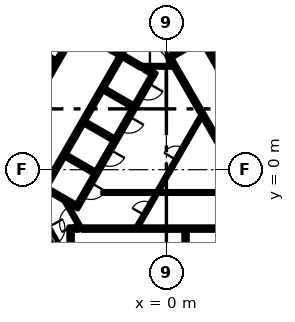
"""IFC4 building model, lengths in metres.
Left out: names, types, materials, properties, quantities, classifications, styles, units other than length and angle.
Written with IfcOpenShell. Run it as: python <this file> out.ifc"""

import sys

from ifc_helpers import new_model, si_unit, direction, frame, frame_2d, origin, place, context, subcontext, project, spatial, polyline, rectangle, outline, extrude, element, fill, save


model = new_model("IFC4")
c1 = context("Model", 3, precision=1e-05, world=origin(), true_north=direction((0.0, 1.0)))
c2 = subcontext(c1, "Body", "Model", "MODEL_VIEW")
j1 = project(units=[si_unit("LENGTHUNIT", "METRE"), si_unit("PLANEANGLEUNIT", "RADIAN")], contexts=[c1])
p1 = place(None, origin())
s1 = spatial("IfcSite", under=j1, at=p1, CompositionType="ELEMENT")
p2 = place(p1, origin())
s2 = spatial("IfcBuilding", under=s1, at=p2, CompositionType="ELEMENT")
p3 = place(p2, frame((0.0, 0.0, 16.2)))
s3 = spatial("IfcBuildingStorey", under=s2, at=p3, CompositionType="ELEMENT", Elevation=16.2)
p4 = place(p3, frame((-15.36, -1.503, 0.0), z_axis=(0.0, 0.0, 1.0), x_axis=(0.50000389221, 0.866023156604, 0.0)))
e1 = element("IfcWall", 1, at=p4, inside=s3, PredefinedType="SOLIDWALL", context=c2, shape_type="SweptSolid", body=[
    extrude(rectangle(XDim=21.0, YDim=0.9, at=frame_2d((10.5, 0.0))), origin(), (0.0, 0.0, 1.0), 5.4),
])
p5 = place(p3, frame((-5.545, -3.875, 0.0), z_axis=(0.0, 0.0, 1.0), x_axis=(1.0, 0.0, 0.0)))
e2 = element("IfcWall", 2, at=p5, inside=s3, PredefinedType="SOLIDWALL", context=c2, shape_type="SweptSolid", body=[
    extrude(rectangle(XDim=11.97, YDim=0.25, at=frame_2d((5.985, 0.0))), origin(), (0.0, 0.0, 1.0), 5.4),
])
p6 = place(p3, frame((-6.425, -3.875, 0.0), z_axis=(0.0, 0.0, 1.0), x_axis=(1.0, 0.0, 0.0)))
e3 = element("IfcWall", 3, at=p6, inside=s3, PredefinedType="SOLIDWALL", context=c2, shape_type="SweptSolid", body=[
    extrude(rectangle(XDim=0.658, YDim=0.25, at=frame_2d((0.329, 0.0))), origin(), (0.0, 0.0, 1.0), 5.4),
])
p7 = place(p3, frame((1.26, -4.0, 0.0), z_axis=(0.0, 0.0, 1.0), x_axis=(0.0, -1.0, 0.0)))
e4 = element("IfcWall", 4, at=p7, inside=s3, PredefinedType="SOLIDWALL", context=c2, shape_type="SweptSolid", body=[
    extrude(rectangle(XDim=2.2, YDim=0.25, at=frame_2d((1.1, 0.0))), origin(), (0.0, 0.0, 1.0), 5.4),
])
p8 = place(p3, frame((-6.3, -4.0, 0.0), z_axis=(0.0, 0.0, 1.0), x_axis=(0.0, -1.0, 0.0)))
e5 = element("IfcWall", 5, at=p8, inside=s3, PredefinedType="SOLIDWALL", context=c2, shape_type="SweptSolid", body=[
    extrude(rectangle(XDim=3.154, YDim=0.25, at=frame_2d((1.577, 0.0))), origin(), (0.0, 0.0, 1.0), 5.4),
])
p9 = place(p3, origin())
e6 = element("IfcWall", 6, at=p9, inside=s3, PredefinedType="SOLIDWALL", context=c2, shape_type="SweptSolid", body=[
    extrude(outline(polyline([(6.552, -3.348), (6.677, -3.564), (6.46, -3.689), (0.448, 6.725), (0.565, 6.725), (0.566, 6.725), (0.566, 6.725), (0.566, 6.875), (0.566, 6.875), (0.565, 6.875), (0.361, 6.875), (0.035, 7.439), (0.252, 7.564), (0.377, 7.348), (6.552, -3.348)])), origin(), (0.0, 0.0, 1.0), 5.4),
])
p10 = place(p3, frame((0.314, 7.456, 0.0), z_axis=(0.0, 0.0, 1.0), x_axis=(0.866013897511, 0.50001992892, 0.0)))
e7 = element("IfcWall", 7, at=p10, inside=s3, PredefinedType="SOLIDWALL", context=c2, shape_type="SweptSolid", body=[
    extrude(rectangle(XDim=3.268, YDim=0.25, at=frame_2d((1.634, 0.0))), origin(), (0.0, 0.0, 1.0), 5.4),
])
p11 = place(p3, frame((-8.06, -1.311, 0.0), z_axis=(0.0, 0.0, 1.0), x_axis=(0.50000273126, 0.866023826885, 0.0)))
e8 = element("IfcWall", 8, at=p11, inside=s3, PredefinedType="SOLIDWALL", context=c2, shape_type="SweptSolid", body=[
    extrude(rectangle(XDim=10.33, YDim=0.25, at=frame_2d((5.165, 0.0))), origin(), (0.0, 0.0, 1.0), 5.4),
])
p12 = place(p3, frame((-1.758, 6.835, 0.0), z_axis=(0.0, 0.0, 1.0), x_axis=(0.865982457891, -0.500074377092, 0.0)))
e9 = element("IfcWall", 9, at=p12, inside=s3, PredefinedType="SOLIDWALL", context=c2, shape_type="SweptSolid", body=[
    extrude(rectangle(XDim=0.2, YDim=0.25, at=frame_2d((0.1, 0.0))), origin(), (0.0, 0.0, 1.0), 5.4),
])
p13 = place(p3, frame((-1.76, 6.836, 0.0), z_axis=(0.0, 0.0, 1.0), x_axis=(-0.865952863304, 0.500125622755, 0.0)))
e10 = element("IfcWall", 10, at=p13, inside=s3, PredefinedType="SOLIDWALL", context=c2, shape_type="SweptSolid", body=[
    extrude(rectangle(XDim=1.258, YDim=0.25, at=frame_2d((0.629, 0.0))), origin(), (0.0, 0.0, 1.0), 5.4),
])
p14 = place(p3, frame((-0.728, 6.24, 0.0), z_axis=(0.0, 0.0, 1.0), x_axis=(-0.865955664968, 0.500120771724, 0.0)))
e11 = element("IfcWall", 11, at=p14, inside=s3, PredefinedType="SOLIDWALL", context=c2, shape_type="SweptSolid", body=[
    extrude(rectangle(XDim=0.778, YDim=0.25, at=frame_2d((0.389, 0.0))), origin(), (0.0, 0.0, 1.0), 5.4),
])
for number, where, z_axis, x_axis in (
    (12, (-2.204, 4.182, 0.0), (0.0, 0.0, 1.0), (-0.866, 0.5, 0.0)),
    (13, (-5.369, 3.1, 0.0), (0.0, 0.0, 1.0), (0.866, -0.5, 0.0)),
    (14, (-4.724, -0.182, 0.0), (0.0, 0.0, 1.0), (-0.866, 0.5, 0.0)),
):
    element("IfcWall", number, at=place(p3, frame(where, z_axis=z_axis, x_axis=x_axis)), inside=s3, PredefinedType="SOLIDWALL", context=c2, shape_type="SweptSolid", body=[
        extrude(rectangle(XDim=2.2, YDim=0.25, at=frame_2d((1.1, 0.0))), origin(), (0.0, 0.0, 1.0), 5.4),
    ])
e15 = element("IfcWall", 15, at=p9, inside=s3, PredefinedType="SOLIDWALL", context=c2, shape_type="SweptSolid", body=[
    extrude(outline(polyline([(-5.922, -2.257), (-5.922, -2.257), (-5.705, -2.382), (-5.83, -2.598), (-6.483, -2.221), (-6.591, -2.033), (-6.591, -2.033), (-6.7, -2.096), (-7.952, -1.373), (-7.827, -1.156), (-5.922, -2.257)])), origin(), (0.0, 0.0, 1.0), 5.4),
])
e16 = element("IfcWall", 16, at=p9, inside=s3, PredefinedType="SOLIDWALL", context=c2, shape_type="SweptSolid", body=[
    extrude(outline(polyline([(-3.128, 7.481), (-3.259, 7.557), (-3.134, 7.773), (-3.003, 7.698), (-3.128, 7.481)])), origin(), (0.0, 0.0, 1.0), 5.4),
])
p15 = place(p3, frame((-7.314, 7.132, 0.0), z_axis=(0.0, 0.0, 1.0), x_axis=(-0.866008176907, 0.50002983664, 0.0)))
e17 = element("IfcWall", 17, at=p15, inside=s3, PredefinedType="SOLIDWALL", context=c2, shape_type="SweptSolid", body=[
    extrude(rectangle(XDim=2.2, YDim=0.25, at=frame_2d((1.1, 0.0))), origin(), (0.0, 0.0, 1.0), 5.4),
])
p16 = place(p3, frame((-1.887, -3.718, 0.0), z_axis=(0.0, 0.0, 1.0), x_axis=(0.500165633897, 0.865929753888, 0.0)))
e18 = element("IfcWall", 18, at=p16, inside=s3, PredefinedType="PARTITIONING", context=c2, shape_type="SweptSolid", body=[
    extrude(rectangle(XDim=0.254, YDim=0.15, at=frame_2d((0.127, 0.0))), origin(), (0.0, 0.0, 1.0), 4.1),
])
p17 = place(p3, frame((-4.2, -1.5, 0.0), z_axis=(0.0, 0.0, 1.0), x_axis=(1.0, 0.0, 0.0)))
e19 = element("IfcWall", 19, at=p17, inside=s3, PredefinedType="PARTITIONING", context=c2, shape_type="SweptSolid", body=[
    extrude(rectangle(XDim=9.359, YDim=0.15, at=frame_2d((4.68, 0.0))), origin(), (0.0, 0.0, 1.0), 4.1),
])
p18 = place(p3, frame((-0.544, -1.393, 0.0), z_axis=(0.0, 0.0, 1.0), x_axis=(0.499928740635, 0.866066541489, 0.0)))
e20 = element("IfcWall", 20, at=p18, inside=s3, PredefinedType="PARTITIONING", context=c2, shape_type="SweptSolid", body=[
    extrude(rectangle(XDim=1.912, YDim=0.15, at=frame_2d((0.956, 0.0))), origin(), (0.0, 0.0, 1.0), 4.1),
])
p19 = place(p3, frame((1.312, 1.822, 0.0), z_axis=(0.0, 0.0, 1.0), x_axis=(0.500003549559, 0.866023354436, 0.0)))
e21 = element("IfcWall", 21, at=p19, inside=s3, PredefinedType="PARTITIONING", context=c2, shape_type="SweptSolid", body=[
    extrude(rectangle(XDim=1.93, YDim=0.15, at=frame_2d((0.965, 0.0))), origin(), (0.0, 0.0, 1.0), 4.1),
])
p20 = place(p3, frame((8.565, -2.185, 0.0), z_axis=(0.0, 0.0, 1.0), x_axis=(-0.499997954832, 0.866026584559, 0.0)))
e22 = element("IfcWall", 22, at=p20, inside=s3, PredefinedType="SOLIDWALL", context=c2, shape_type="SweptSolid", body=[
    extrude(rectangle(XDim=12.35, YDim=0.25, at=frame_2d((6.175, 0.0))), origin(), (0.0, 0.0, 1.0), 5.4),
])
p21 = place(p20, frame((5.725, 0.0, 0.0)))
e23 = element("IfcOpeningElement", 23, at=p21, cuts=e22, PredefinedType="OPENING", context=c2, shape_type="SweptSolid", body=[
    extrude(rectangle(XDim=0.9, YDim=2.1, at=frame_2d((0.45, 1.05))), frame((0.0, 0.135, 0.0), z_axis=(0.0, -1.0, 0.0), x_axis=(1.0, 0.0, 0.0)), (0.0, 0.0, 1.0), 0.27),
])
p22 = place(p3, frame((-6.008, 9.144, 0.0), z_axis=(0.0, 0.0, 1.0), x_axis=(-0.500006956611, -0.866021387346, 0.0)))
e24 = element("IfcWall", 24, at=p22, inside=s3, PredefinedType="SOLIDWALL", context=c2, shape_type="SweptSolid", body=[
    extrude(rectangle(XDim=9.83, YDim=0.25, at=frame_2d((4.915, 0.0))), origin(), (0.0, 0.0, 1.0), 5.4),
])
p23 = place(p22, frame((6.985, 0.0, 0.0)))
e25 = element("IfcOpeningElement", 25, at=p23, cuts=e24, PredefinedType="OPENING", context=c2, shape_type="SweptSolid", body=[
    extrude(rectangle(XDim=0.9, YDim=2.1, at=frame_2d((0.45, 1.05))), frame((0.0, 0.135, 0.0), z_axis=(0.0, -1.0, 0.0), x_axis=(1.0, 0.0, 0.0)), (0.0, 0.0, 1.0), 0.27),
])
p24 = place(p3, frame((-0.898, 6.194, 0.0), z_axis=(0.0, 0.0, 1.0), x_axis=(-0.499996202215, -0.866027596426, 0.0)))
e26 = element("IfcWall", 26, at=p24, inside=s3, PredefinedType="SOLIDWALL", context=c2, shape_type="SweptSolid", body=[
    extrude(rectangle(XDim=9.83, YDim=0.25, at=frame_2d((4.915, 0.0))), origin(), (0.0, 0.0, 1.0), 5.4),
])
p25 = place(p24, frame((0.585, 0.0, 0.0)))
e27 = element("IfcOpeningElement", 27, at=p25, cuts=e26, PredefinedType="OPENING", context=c2, shape_type="SweptSolid", body=[
    extrude(rectangle(XDim=1.1, YDim=2.1, at=frame_2d((0.55, 1.05))), frame((0.0, 0.135, 0.0), z_axis=(0.0, -1.0, 0.0), x_axis=(1.0, 0.0, 0.0)), (0.0, 0.0, 1.0), 0.27),
])
p26 = place(p24, frame((3.105, 0.0, 0.0)))
e28 = element("IfcOpeningElement", 28, at=p26, cuts=e26, PredefinedType="OPENING", context=c2, shape_type="SweptSolid", body=[
    extrude(rectangle(XDim=1.1, YDim=2.1, at=frame_2d((0.55, 1.05))), frame((0.0, 0.135, 0.0), z_axis=(0.0, -1.0, 0.0), x_axis=(1.0, 0.0, 0.0)), (0.0, 0.0, 1.0), 0.27),
])
p27 = place(p24, frame((5.625, 0.0, 0.0)))
e29 = element("IfcOpeningElement", 29, at=p27, cuts=e26, PredefinedType="OPENING", context=c2, shape_type="SweptSolid", body=[
    extrude(rectangle(XDim=1.1, YDim=2.1, at=frame_2d((0.55, 1.05))), frame((0.0, 0.135, 0.0), z_axis=(0.0, -1.0, 0.0), x_axis=(1.0, 0.0, 0.0)), (0.0, 0.0, 1.0), 0.27),
])
p28 = place(p24, frame((8.145, 0.0, 0.0)))
e30 = element("IfcOpeningElement", 30, at=p28, cuts=e26, PredefinedType="OPENING", context=c2, shape_type="SweptSolid", body=[
    extrude(rectangle(XDim=1.1, YDim=2.1, at=frame_2d((0.55, 1.05))), frame((0.0, 0.135, 0.0), z_axis=(0.0, -1.0, 0.0), x_axis=(1.0, 0.0, 0.0)), (0.0, 0.0, 1.0), 0.27),
])
p29 = place(p3, frame((-8.103, -3.466, 0.0), z_axis=(0.0, 0.0, 1.0), x_axis=(0.500078061341, -0.865980330357, 0.0)))
e31 = element("IfcWall", 31, at=p29, inside=s3, PredefinedType="SOLIDWALL", context=c2, shape_type="SweptSolid", body=[
    extrude(rectangle(XDim=2.1, YDim=0.4, at=frame_2d((1.05, 0.0))), origin(), (0.0, 0.0, 1.0), 5.4),
])
p30 = place(p29, frame((0.45, 0.0, 0.0)))
e32 = element("IfcOpeningElement", 32, at=p30, cuts=e31, PredefinedType="OPENING", context=c2, shape_type="SweptSolid", body=[
    extrude(rectangle(XDim=1.2, YDim=2.1, at=frame_2d((0.6, 1.05))), frame((0.0, 0.21, 0.0), z_axis=(0.0, -1.0, 0.0), x_axis=(1.0, 0.0, 0.0)), (0.0, 0.0, 1.0), 0.42),
])
p31 = place(p3, frame((-1.76, -3.498, 0.0), z_axis=(0.0, 0.0, 1.0), x_axis=(0.499977374825, 0.866038466041, 0.0)))
e33 = element("IfcWall", 33, at=p31, inside=s3, PredefinedType="PARTITIONING", context=c2, shape_type="SweptSolid", body=[
    extrude(rectangle(XDim=2.1, YDim=0.15, at=frame_2d((1.05, 0.0))), origin(), (0.0, 0.0, 1.0), 4.1),
])
p32 = place(p31, frame((0.6, 0.0, 0.0)))
e34 = element("IfcOpeningElement", 34, at=p32, cuts=e33, PredefinedType="OPENING", context=c2, shape_type="SweptSolid", body=[
    extrude(rectangle(XDim=0.9, YDim=2.1, at=frame_2d((0.45, 1.05))), frame((0.0, 0.085, 0.0), z_axis=(0.0, -1.0, 0.0), x_axis=(1.0, 0.0, 0.0)), (0.0, 0.0, 1.0), 0.17),
])
p33 = place(p3, frame((-1.534, 6.8, 0.0), z_axis=(0.0, 0.0, 1.0), x_axis=(1.0, 0.0, 0.0)))
e35 = element("IfcWall", 35, at=p33, inside=s3, PredefinedType="PARTITIONING", context=c2, shape_type="SweptSolid", body=[
    extrude(rectangle(XDim=2.1, YDim=0.15, at=frame_2d((1.05, 0.0))), origin(), (0.0, 0.0, 1.0), 4.1),
])
p34 = place(p33, frame((0.45, 0.0, 0.0)))
e36 = element("IfcOpeningElement", 36, at=p34, cuts=e35, PredefinedType="OPENING", context=c2, shape_type="SweptSolid", body=[
    extrude(rectangle(XDim=1.2, YDim=2.1, at=frame_2d((0.6, 1.05))), frame((0.0, 0.085, 0.0), z_axis=(0.0, -1.0, 0.0), x_axis=(1.0, 0.0, 0.0)), (0.0, 0.0, 1.0), 0.17),
])
p35 = place(p3, frame((-5.606, -3.89, 0.0), z_axis=(0.0, 0.0, 1.0), x_axis=(-0.500027713859, 0.866009402589, 0.0)))
e37 = element("IfcWall", 37, at=p35, inside=s3, PredefinedType="PARTITIONING", context=c2, shape_type="SweptSolid", body=[
    extrude(rectangle(XDim=2.1, YDim=0.15, at=frame_2d((1.05, 0.0))), origin(), (0.0, 0.0, 1.0), 4.1),
])
p36 = place(p35, frame((0.45, 0.0, 0.0)))
e38 = element("IfcOpeningElement", 38, at=p36, cuts=e37, PredefinedType="OPENING", context=c2, shape_type="SweptSolid", body=[
    extrude(rectangle(XDim=1.2, YDim=2.1, at=frame_2d((0.6, 1.05))), frame((0.0, 0.085, 0.0), z_axis=(0.0, -1.0, 0.0), x_axis=(1.0, 0.0, 0.0)), (0.0, 0.0, 1.0), 0.17),
])
p37 = place(p3, frame((-4.409, 8.365, 0.0), z_axis=(0.0, 0.0, 1.0), x_axis=(0.866034573852, -0.49998411664, 0.0)))
e39 = element("IfcWall", 39, at=p37, inside=s3, PredefinedType="SOLIDWALL", context=c2, shape_type="SweptSolid", body=[
    extrude(rectangle(XDim=1.4, YDim=0.25, at=frame_2d((0.7, 0.0))), origin(), (0.0, 0.0, 1.0), 5.4),
])
p38 = place(p37, frame((0.1, 0.0, 0.0)))
e40 = element("IfcOpeningElement", 40, at=p38, cuts=e39, PredefinedType="OPENING", context=c2, shape_type="SweptSolid", body=[
    extrude(rectangle(XDim=1.2, YDim=2.1, at=frame_2d((0.6, 1.05))), frame((0.0, 0.135, 0.0), z_axis=(0.0, -1.0, 0.0), x_axis=(1.0, 0.0, 0.0)), (0.0, 0.0, 1.0), 0.27),
])
p39 = place(p3, frame((0.412, 0.263, 0.0), z_axis=(0.0, 0.0, 1.0), x_axis=(0.500062916607, 0.865989075817, 0.0)))
e41 = element("IfcWall", 41, at=p39, inside=s3, PredefinedType="PARTITIONING", context=c2, shape_type="SweptSolid", body=[
    extrude(rectangle(XDim=1.8, YDim=0.15, at=frame_2d((0.9, 0.0))), origin(), (0.0, 0.0, 1.0), 4.1),
])
p40 = place(p39, frame((0.45, 0.0, 0.0)))
e42 = element("IfcOpeningElement", 42, at=p40, cuts=e41, PredefinedType="OPENING", context=c2, shape_type="SweptSolid", body=[
    extrude(rectangle(XDim=0.9, YDim=2.1, at=frame_2d((0.45, 1.05))), frame((0.0, 0.085, 0.0), z_axis=(0.0, -1.0, 0.0), x_axis=(1.0, 0.0, 0.0)), (0.0, 0.0, 1.0), 0.17),
])
p41 = place(p3, frame((-6.875, 40.198, 0.0), z_axis=(0.0, 0.0, 1.0), x_axis=(-0.500000527961, -0.866025098966, 0.0)))
e43 = element("IfcWall", 43, at=p41, inside=s3, PredefinedType="SOLIDWALL", context=c2, shape_type="SweptSolid", body=[
    extrude(rectangle(XDim=62.75, YDim=0.25, at=frame_2d((31.375, 0.0))), origin(), (0.0, 0.0, 1.0), 5.0),
])
p42 = place(p25, origin())
e44 = element("IfcDoor", 44, at=p42, inside=s3, OperationType="DOUBLE_DOOR_SLIDING", PredefinedType="DOOR", context=c2, shape_type="SweptSolid", body=[
    extrude(rectangle(XDim=1.1, YDim=2.1, at=frame_2d((0.55, 1.05))), frame((0.0, 0.025, 0.0), z_axis=(0.0, -1.0, 0.0), x_axis=(1.0, 0.0, 0.0)), (0.0, 0.0, 1.0), 0.05),
])
fill(e27, e44)
p43 = place(p26, origin())
e45 = element("IfcDoor", 45, at=p43, inside=s3, OperationType="DOUBLE_DOOR_SLIDING", PredefinedType="DOOR", context=c2, shape_type="SweptSolid", body=[
    extrude(rectangle(XDim=1.1, YDim=2.1, at=frame_2d((0.55, 1.05))), frame((0.0, 0.025, 0.0), z_axis=(0.0, -1.0, 0.0), x_axis=(1.0, 0.0, 0.0)), (0.0, 0.0, 1.0), 0.05),
])
fill(e28, e45)
p44 = place(p27, origin())
e46 = element("IfcDoor", 46, at=p44, inside=s3, OperationType="DOUBLE_DOOR_SLIDING", PredefinedType="DOOR", context=c2, shape_type="SweptSolid", body=[
    extrude(rectangle(XDim=1.1, YDim=2.1, at=frame_2d((0.55, 1.05))), frame((0.0, 0.025, 0.0), z_axis=(0.0, -1.0, 0.0), x_axis=(1.0, 0.0, 0.0)), (0.0, 0.0, 1.0), 0.05),
])
fill(e29, e46)
p45 = place(p28, origin())
e47 = element("IfcDoor", 47, at=p45, inside=s3, OperationType="DOUBLE_DOOR_SLIDING", PredefinedType="DOOR", context=c2, shape_type="SweptSolid", body=[
    extrude(rectangle(XDim=1.1, YDim=2.1, at=frame_2d((0.55, 1.05))), frame((0.0, 0.025, 0.0), z_axis=(0.0, -1.0, 0.0), x_axis=(1.0, 0.0, 0.0)), (0.0, 0.0, 1.0), 0.05),
])
fill(e30, e47)
p46 = place(p30, origin())
e48 = element("IfcDoor", 48, at=p46, inside=s3, OperationType="SINGLE_SWING_LEFT", PredefinedType="DOOR", context=c2, shape_type="SweptSolid", body=[
    extrude(rectangle(XDim=1.2, YDim=2.1, at=frame_2d((0.6, 1.05))), frame((0.0, 0.025, 0.0), z_axis=(0.0, -1.0, 0.0), x_axis=(1.0, 0.0, 0.0)), (0.0, 0.0, 1.0), 0.05),
])
fill(e32, e48)
p47 = place(p32, origin())
e49 = element("IfcDoor", 49, at=p47, inside=s3, OperationType="SINGLE_SWING_LEFT", PredefinedType="DOOR", context=c2, shape_type="SweptSolid", body=[
    extrude(rectangle(XDim=0.9, YDim=2.1, at=frame_2d((0.45, 1.05))), frame((0.0, 0.025, 0.0), z_axis=(0.0, -1.0, 0.0), x_axis=(1.0, 0.0, 0.0)), (0.0, 0.0, 1.0), 0.05),
])
fill(e34, e49)
p48 = place(p34, origin())
e50 = element("IfcDoor", 50, at=p48, inside=s3, OperationType="SINGLE_SWING_LEFT", PredefinedType="DOOR", context=c2, shape_type="SweptSolid", body=[
    extrude(rectangle(XDim=1.2, YDim=2.1, at=frame_2d((0.6, 1.05))), frame((0.0, 0.025, 0.0), z_axis=(0.0, -1.0, 0.0), x_axis=(1.0, 0.0, 0.0)), (0.0, 0.0, 1.0), 0.05),
])
fill(e36, e50)
p49 = place(p36, origin())
e51 = element("IfcDoor", 51, at=p49, inside=s3, OperationType="SINGLE_SWING_LEFT", PredefinedType="DOOR", context=c2, shape_type="SweptSolid", body=[
    extrude(rectangle(XDim=1.2, YDim=2.1, at=frame_2d((0.6, 1.05))), frame((0.0, 0.025, 0.0), z_axis=(0.0, -1.0, 0.0), x_axis=(1.0, 0.0, 0.0)), (0.0, 0.0, 1.0), 0.05),
])
fill(e38, e51)
p50 = place(p38, origin())
e52 = element("IfcDoor", 52, at=p50, inside=s3, OperationType="SINGLE_SWING_LEFT", PredefinedType="DOOR", context=c2, shape_type="SweptSolid", body=[
    extrude(rectangle(XDim=1.2, YDim=2.1, at=frame_2d((0.6, 1.05))), frame((0.0, 0.025, 0.0), z_axis=(0.0, -1.0, 0.0), x_axis=(1.0, 0.0, 0.0)), (0.0, 0.0, 1.0), 0.05),
])
fill(e40, e52)
p51 = place(p40, origin())
e53 = element("IfcDoor", 53, at=p51, inside=s3, OperationType="SINGLE_SWING_LEFT", PredefinedType="DOOR", context=c2, shape_type="SweptSolid", body=[
    extrude(rectangle(XDim=0.9, YDim=2.1, at=frame_2d((0.45, 1.05))), frame((0.0, 0.025, 0.0), z_axis=(0.0, -1.0, 0.0), x_axis=(1.0, 0.0, 0.0)), (0.0, 0.0, 1.0), 0.05),
])
fill(e42, e53)
save(model, sys.argv[1])
